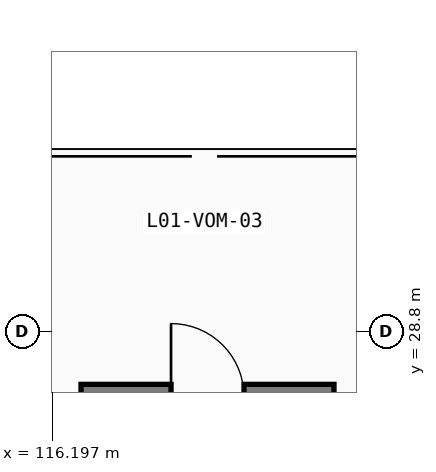
"""IFC4 building model, lengths in metres.
Left out: names, types, materials, properties, quantities, classifications, styles, units other than length and angle.
Written with IfcOpenShell. Run it as: python <this file> out.ifc"""

import sys

from ifc_helpers import new_model, si_unit, direction, frame, frame_2d, origin, place, context, subcontext, project, spatial, rectangle, extrude, element, save


model = new_model("IFC4")
c1 = context("Model", 3, precision=1e-05, world=origin(), true_north=direction((0.0, 1.0)))
c2 = subcontext(c1, "Body", "Model", "MODEL_VIEW")
j1 = project(units=[si_unit("LENGTHUNIT", "METRE"), si_unit("PLANEANGLEUNIT", "RADIAN")], contexts=[c1])
p1 = place(None, origin())
s1 = spatial("IfcSite", under=j1, at=p1, CompositionType="ELEMENT")
p2 = place(p1, origin())
s2 = spatial("IfcBuilding", under=s1, at=p2, CompositionType="ELEMENT")
p3 = place(p2, frame((0.0, 0.0, 4.8)))
s3 = spatial("IfcBuildingStorey", under=s2, at=p3, CompositionType="ELEMENT", Elevation=4.8)
p4 = place(p3, frame((120.83, 27.73, 0.0), z_axis=(0.0, 0.0, 1.0), x_axis=(-1.0, 0.0, 0.0)))
e1 = element("IfcWall", 1, at=p4, inside=s3, PredefinedType="SHEAR", context=c2, shape_type="SweptSolid", body=[
    extrude(rectangle(XDim=4.16, YDim=0.4, at=frame_2d((2.08, 0.0))), origin(), (0.0, 0.0, 1.0), 4.52),
])
p5 = place(p4, frame((2.68, 0.0, 0.0), z_axis=(0.0, 0.0, 1.0), x_axis=(-1.0, 0.0, 0.0)))
e2 = element("IfcOpeningElement", 2, at=p5, cuts=e1, PredefinedType="OPENING", context=c2, shape_type="SweptSolid", body=[
    extrude(rectangle(XDim=1.2, YDim=2.2, at=frame_2d((0.6, 1.1))), frame((0.0, 0.21, 0.0), z_axis=(0.0, -1.0, 0.0), x_axis=(1.0, 0.0, 0.0)), (0.0, 0.0, 1.0), 0.42),
])
save(model, sys.argv[1])
